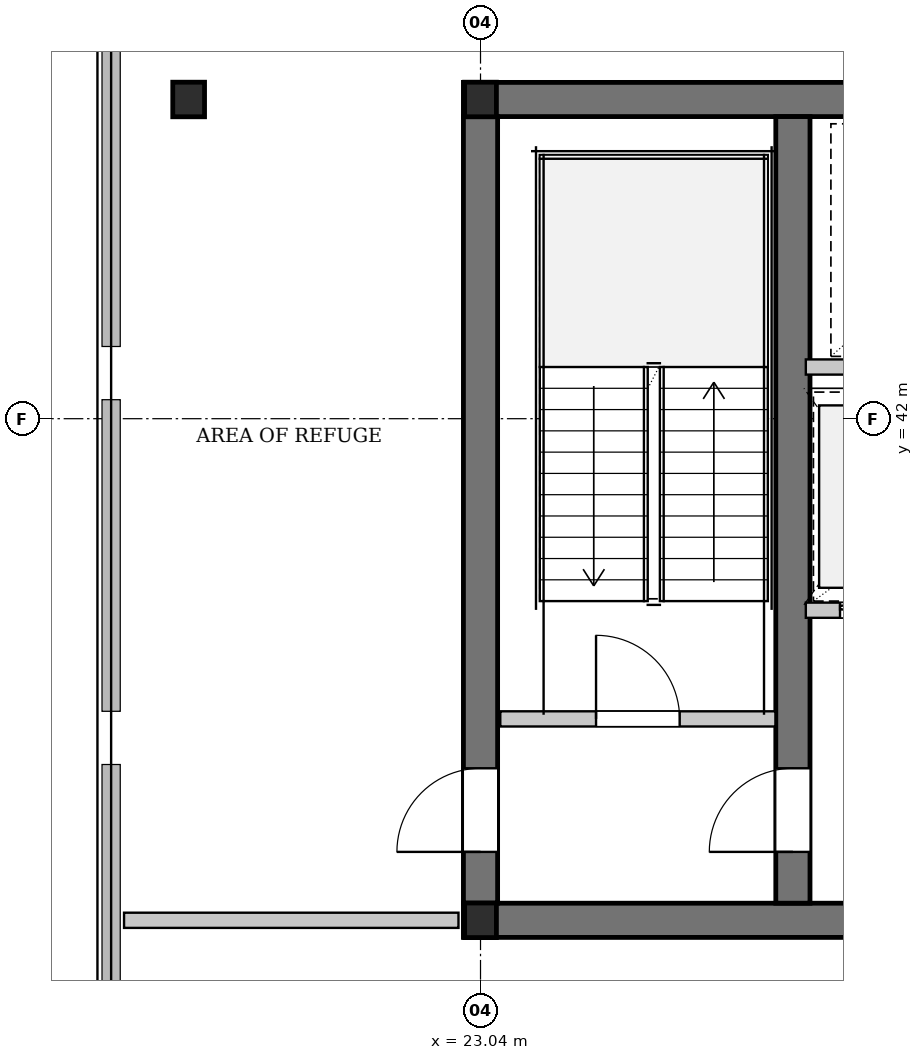
"""IFC4 building model, lengths in metres.
Left out: names, types, materials, properties, quantities, classifications, styles, units other than length and angle.
Written with IfcOpenShell. Run it as: python <this file> out.ifc"""

import sys

from ifc_helpers import new_model, si_unit, direction, frame, frame_2d, origin, origin_2d, place, context, subcontext, project, spatial, rectangle, i_section, extrude, element, fill, save


model = new_model("IFC4")
c1 = context("Model", 3, precision=1e-05, world=origin(), true_north=direction((0.0, 1.0)))
c2 = subcontext(c1, "Body", "Model", "MODEL_VIEW")
j1 = project(units=[si_unit("LENGTHUNIT", "METRE"), si_unit("PLANEANGLEUNIT", "RADIAN")], contexts=[c1])
p1 = place(None, origin())
s1 = spatial("IfcSite", under=j1, at=p1, CompositionType="ELEMENT")
p2 = place(p1, origin())
s2 = spatial("IfcBuilding", under=s1, at=p2, CompositionType="ELEMENT")
p3 = place(p2, frame((0.0, 0.0, 200.3)))
s3 = spatial("IfcBuildingStorey", under=s2, at=p3, CompositionType="ELEMENT", Elevation=200.3)
p4 = place(p3, frame((22.815, 46.2, 0.0), z_axis=(0.0, 0.0, 1.0), x_axis=(1.0, 0.0, 0.0)))
e1 = element("IfcWall", 1, at=p4, inside=s3, PredefinedType="SHEAR", context=c2, shape_type="SweptSolid", body=[
    extrude(rectangle(XDim=31.17, YDim=0.45, at=frame_2d((15.585, 0.0))), origin(), (0.0, 0.0, 1.0), 3.78),
])
p5 = place(p3, frame((22.815, 35.4, 0.0), z_axis=(0.0, 0.0, 1.0), x_axis=(1.0, 0.0, 0.0)))
e2 = element("IfcWall", 2, at=p5, inside=s3, PredefinedType="SHEAR", context=c2, shape_type="SweptSolid", body=[
    extrude(rectangle(XDim=5.385, YDim=0.45, at=frame_2d((2.692, 0.0))), origin(), (0.0, 0.0, 1.0), 3.78),
])
p6 = place(p3, frame((23.04, 35.625, 0.0), z_axis=(0.0, 0.0, 1.0), x_axis=(0.0, 1.0, 0.0)))
e3 = element("IfcWall", 3, at=p6, inside=s3, PredefinedType="SHEAR", context=c2, shape_type="SweptSolid", body=[
    extrude(rectangle(XDim=10.35, YDim=0.45, at=frame_2d((5.175, 0.0))), origin(), (0.0, 0.0, 1.0), 3.78),
])
p7 = place(p6, frame((0.675, 0.0, 0.0)))
e4 = element("IfcOpeningElement", 4, at=p7, cuts=e3, PredefinedType="OPENING", context=c2, shape_type="SweptSolid", body=[
    extrude(rectangle(XDim=1.1, YDim=2.15, at=frame_2d((0.55, 1.075))), frame((0.0, 0.235, 0.0), z_axis=(0.0, -1.0, 0.0), x_axis=(1.0, 0.0, 0.0)), (0.0, 0.0, 1.0), 0.47),
])
p8 = place(p3, frame((27.15, 35.625, 0.0), z_axis=(0.0, 0.0, 1.0), x_axis=(0.0, 1.0, 0.0)))
e5 = element("IfcWall", 5, at=p8, inside=s3, PredefinedType="SHEAR", context=c2, shape_type="SweptSolid", body=[
    extrude(rectangle(XDim=10.35, YDim=0.45, at=frame_2d((5.175, 0.0))), origin(), (0.0, 0.0, 1.0), 3.78),
])
p9 = place(p8, frame((0.675, 0.0, 0.0)))
e6 = element("IfcOpeningElement", 6, at=p9, cuts=e5, PredefinedType="OPENING", context=c2, shape_type="SweptSolid", body=[
    extrude(rectangle(XDim=1.1, YDim=2.15, at=frame_2d((0.55, 1.075))), frame((0.0, 0.235, 0.0), z_axis=(0.0, -1.0, 0.0), x_axis=(1.0, 0.0, 0.0)), (0.0, 0.0, 1.0), 0.47),
])
for number, where, z_axis, x_axis in (
    (7, (23.04, 35.4, 0.0), (0.0, 0.0, 1.0), (1.0, 0.0, 0.0)),
    (8, (23.04, 46.2, 0.0), (0.0, 0.0, 1.0), (1.0, 0.0, 0.0)),
    (9, (19.2, 46.2, 0.0), (0.0, 0.0, 1.0), (1.0, 0.0, 0.0)),
):
    element("IfcColumn", number, at=place(p3, frame(where, z_axis=z_axis, x_axis=x_axis)), inside=s3, PredefinedType="COLUMN", context=c2, shape_type="SweptSolid", body=[
        extrude(i_section(OverallWidth=0.418, OverallDepth=0.455, WebThickness=0.042, FlangeThickness=0.068, FilletRadius=0.015, at=origin_2d()), origin(), (0.0, 0.0, 1.0), 4.2),
    ])
p10 = place(p3, frame((23.3, 38.05, 0.0), z_axis=(0.0, 0.0, 1.0), x_axis=(1.0, 0.0, 0.0)))
e10 = element("IfcWall", 10, at=p10, inside=s3, PredefinedType="PARTITIONING", context=c2, shape_type="SweptSolid", body=[
    extrude(rectangle(XDim=3.62, YDim=0.2, at=frame_2d((1.81, 0.0))), origin(), (0.0, 0.0, 1.0), 3.78),
])
p11 = place(p10, frame((1.26, 0.0, 0.0)))
e11 = element("IfcOpeningElement", 11, at=p11, cuts=e10, PredefinedType="OPENING", context=c2, shape_type="SweptSolid", body=[
    extrude(rectangle(XDim=1.1, YDim=2.15, at=frame_2d((0.55, 1.075))), frame((0.0, 0.11, 0.0), z_axis=(0.0, -1.0, 0.0), x_axis=(1.0, 0.0, 0.0)), (0.0, 0.0, 1.0), 0.22),
])
p12 = place(p3, frame((27.32, 39.48, 0.0), z_axis=(0.0, 0.0, 1.0), x_axis=(1.0, 0.0, 0.0)))
e12 = element("IfcWall", 12, at=p12, inside=s3, PredefinedType="PARTITIONING", context=c2, shape_type="SweptSolid", body=[
    extrude(rectangle(XDim=3.94, YDim=0.2, at=frame_2d((1.97, 0.0))), origin(), (0.0, 0.0, 1.0), 3.78),
])
p13 = place(p12, frame((0.45, 0.0, 0.0)))
e13 = element("IfcOpeningElement", 13, at=p13, cuts=e12, PredefinedType="OPENING", context=c2, shape_type="SweptSolid", body=[
    extrude(rectangle(XDim=1.1, YDim=2.2, at=frame_2d((0.55, 1.1))), frame((0.0, 0.11, 0.0), z_axis=(0.0, -1.0, 0.0), x_axis=(1.0, 0.0, 0.0)), (0.0, 0.0, 1.0), 0.22),
])
p14 = place(p12, frame((2.41, 0.0, 0.0)))
e14 = element("IfcOpeningElement", 14, at=p14, cuts=e12, PredefinedType="OPENING", context=c2, shape_type="SweptSolid", body=[
    extrude(rectangle(XDim=1.1, YDim=2.2, at=frame_2d((0.55, 1.1))), frame((0.0, 0.11, 0.0), z_axis=(0.0, -1.0, 0.0), x_axis=(1.0, 0.0, 0.0)), (0.0, 0.0, 1.0), 0.22),
])
p15 = place(p3, frame((27.32, 42.68, 0.0), z_axis=(0.0, 0.0, 1.0), x_axis=(1.0, 0.0, 0.0)))
e15 = element("IfcWall", 15, at=p15, inside=s3, PredefinedType="PARTITIONING", context=c2, shape_type="SweptSolid", body=[
    extrude(rectangle(XDim=5.33, YDim=0.2, at=frame_2d((2.665, 0.0))), origin(), (0.0, 0.0, 1.0), 3.78),
])
p16 = place(p15, frame((4.18, 0.0, 0.0)))
e16 = element("IfcOpeningElement", 16, at=p16, cuts=e15, PredefinedType="OPENING", context=c2, shape_type="SweptSolid", body=[
    extrude(rectangle(XDim=0.9, YDim=2.15, at=frame_2d((0.45, 1.075))), frame((0.0, 0.11, 0.0), z_axis=(0.0, -1.0, 0.0), x_axis=(1.0, 0.0, 0.0)), (0.0, 0.0, 1.0), 0.22),
])
p17 = place(p3, frame((18.35, 35.4, 0.0), z_axis=(0.0, 0.0, 1.0), x_axis=(1.0, 0.0, 0.0)))
e17 = element("IfcWall", 17, at=p17, inside=s3, PredefinedType="PARTITIONING", context=c2, shape_type="SweptSolid", body=[
    extrude(rectangle(XDim=4.4, YDim=0.2, at=frame_2d((2.2, 0.0))), origin(), (0.0, 0.0, 1.0), 3.78),
])
p18 = place(p11, origin())
e18 = element("IfcDoor", 18, at=p18, inside=s3, OperationType="SINGLE_SWING_LEFT", PredefinedType="DOOR", context=c2, shape_type="SweptSolid", body=[
    extrude(rectangle(XDim=1.1, YDim=2.15, at=frame_2d((0.55, 1.075))), frame((0.0, 0.025, 0.0), z_axis=(0.0, -1.0, 0.0), x_axis=(1.0, 0.0, 0.0)), (0.0, 0.0, 1.0), 0.05),
])
fill(e11, e18)
p19 = place(p13, origin())
e19 = element("IfcDoor", 19, at=p19, inside=s3, OperationType="DOUBLE_DOOR_SLIDING", PredefinedType="DOOR", context=c2, shape_type="SweptSolid", body=[
    extrude(rectangle(XDim=1.1, YDim=2.2, at=frame_2d((0.55, 1.1))), frame((0.0, 0.025, 0.0), z_axis=(0.0, -1.0, 0.0), x_axis=(1.0, 0.0, 0.0)), (0.0, 0.0, 1.0), 0.05),
])
fill(e13, e19)
p20 = place(p9, origin())
e20 = element("IfcDoor", 20, at=p20, inside=s3, OperationType="SINGLE_SWING_LEFT", PredefinedType="DOOR", context=c2, shape_type="SweptSolid", body=[
    extrude(rectangle(XDim=1.1, YDim=2.15, at=frame_2d((0.55, 1.075))), frame((0.0, 0.025, 0.0), z_axis=(0.0, -1.0, 0.0), x_axis=(1.0, 0.0, 0.0)), (0.0, 0.0, 1.0), 0.05),
])
fill(e6, e20)
p21 = place(p7, origin())
e21 = element("IfcDoor", 21, at=p21, inside=s3, OperationType="SINGLE_SWING_LEFT", PredefinedType="DOOR", context=c2, shape_type="SweptSolid", body=[
    extrude(rectangle(XDim=1.1, YDim=2.15, at=frame_2d((0.55, 1.075))), frame((0.0, 0.025, 0.0), z_axis=(0.0, -1.0, 0.0), x_axis=(1.0, 0.0, 0.0)), (0.0, 0.0, 1.0), 0.05),
])
fill(e4, e21)
save(model, sys.argv[1])
